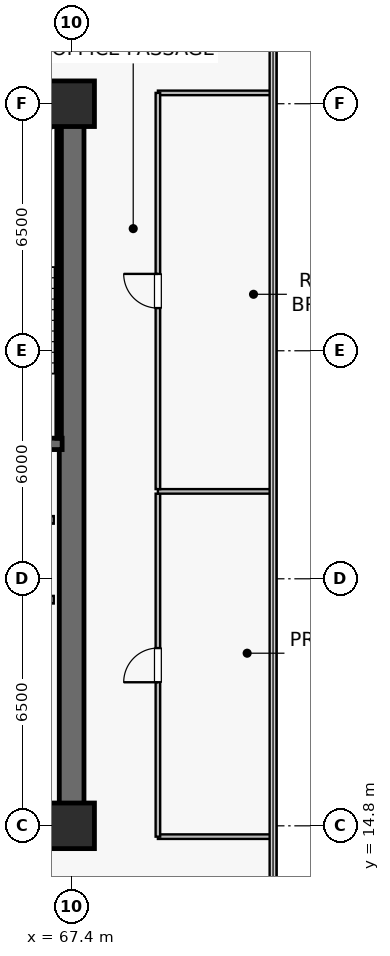
"""IFC4 building model, lengths in metres.
Left out: names, types, materials, properties, quantities, classifications, styles, units other than length and angle.
Written with IfcOpenShell. Run it as: python <this file> out.ifc"""

import sys

from ifc_helpers import new_model, si_unit, direction, frame, frame_2d, origin, origin_2d, place, context, subcontext, project, spatial, rectangle, extrude, source, transform, mapped, element, fill, save


model = new_model("IFC4")
c1 = context("Model", 3, precision=1e-05, world=origin(), true_north=direction((0.0, 1.0)))
c2 = subcontext(c1, "Body", "Model", "MODEL_VIEW")
j1 = project(units=[si_unit("LENGTHUNIT", "METRE"), si_unit("PLANEANGLEUNIT", "RADIAN")], contexts=[c1])
p1 = place(None, origin())
s1 = spatial("IfcSite", under=j1, at=p1, CompositionType="ELEMENT")
p2 = place(p1, origin())
s2 = spatial("IfcBuilding", under=s1, at=p2, CompositionType="ELEMENT")
p3 = place(p2, frame((0.0, 0.0, 183.0)))
s3 = spatial("IfcBuildingStorey", under=s2, at=p3, CompositionType="ELEMENT", Elevation=183.0)
p4 = place(p3, frame((52.275, 14.8, 0.0), z_axis=(0.0, 0.0, 1.0), x_axis=(1.0, 0.0, 0.0)))
e1 = element("IfcWall", 1, at=p4, inside=s3, PredefinedType="SHEAR", context=c2, shape_type="SweptSolid", body=[
    extrude(rectangle(XDim=15.45, YDim=0.65, at=frame_2d((7.725, 0.0))), origin(), (0.0, 0.0, 1.0), 3.79),
])
p5 = place(p3, frame((52.275, 33.8, 0.0), z_axis=(0.0, 0.0, 1.0), x_axis=(1.0, 0.0, 0.0)))
e2 = element("IfcWall", 2, at=p5, inside=s3, PredefinedType="SHEAR", context=c2, shape_type="SweptSolid", body=[
    extrude(rectangle(XDim=15.45, YDim=0.65, at=frame_2d((7.725, 0.0))), origin(), (0.0, 0.0, 1.0), 3.79),
])
p6 = place(p5, frame((8.825, 0.0, 0.0)))
e3 = element("IfcOpeningElement", 3, at=p6, cuts=e2, PredefinedType="OPENING", context=c2, shape_type="SweptSolid", body=[
    extrude(rectangle(XDim=0.95, YDim=2.15, at=frame_2d((0.475, 1.075))), frame((0.0, 0.335, 0.0), z_axis=(0.0, -1.0, 0.0), x_axis=(1.0, 0.0, 0.0)), (0.0, 0.0, 1.0), 0.67),
])
p7 = place(p5, frame((5.46, 0.0, 0.0)))
e4 = element("IfcOpeningElement", 4, at=p7, cuts=e2, PredefinedType="OPENING", context=c2, shape_type="SweptSolid", body=[
    extrude(rectangle(XDim=0.95, YDim=2.15, at=frame_2d((0.475, 1.075))), frame((0.0, 0.335, 0.0), z_axis=(0.0, -1.0, 0.0), x_axis=(1.0, 0.0, 0.0)), (0.0, 0.0, 1.0), 0.67),
])
p8 = place(p5, frame((2.06, 0.0, 0.0)))
e5 = element("IfcOpeningElement", 5, at=p8, cuts=e2, PredefinedType="OPENING", context=c2, shape_type="SweptSolid", body=[
    extrude(rectangle(XDim=0.95, YDim=2.15, at=frame_2d((0.475, 1.075))), frame((0.0, 0.335, 0.0), z_axis=(0.0, -1.0, 0.0), x_axis=(1.0, 0.0, 0.0)), (0.0, 0.0, 1.0), 0.67),
])
p9 = place(p3, frame((67.4, 15.125, 0.0), z_axis=(0.0, 0.0, 1.0), x_axis=(0.0, 1.0, 0.0)))
e6 = element("IfcWall", 6, at=p9, inside=s3, PredefinedType="SHEAR", context=c2, shape_type="SweptSolid", body=[
    extrude(rectangle(XDim=18.35, YDim=0.65, at=frame_2d((9.175, 0.0))), origin(), (0.0, 0.0, 1.0), 3.79),
])
p10 = place(p3, frame((63.35, 24.85, 0.0), z_axis=(0.0, 0.0, 1.0), x_axis=(1.0, 0.0, 0.0)))
e7 = element("IfcWall", 7, at=p10, inside=s3, PredefinedType="SHEAR", context=c2, shape_type="SweptSolid", body=[
    extrude(rectangle(XDim=3.8, YDim=0.3, at=frame_2d((1.9, 0.0))), origin(), (0.0, 0.0, 1.0), 3.79),
])
p11 = place(p3, frame((63.35, 33.4, 0.0), z_axis=(0.0, 0.0, 1.0), x_axis=(1.0, 0.0, 0.0)))
e8 = element("IfcWall", 8, at=p11, inside=s3, PredefinedType="SOLIDWALL", context=c2, shape_type="SweptSolid", body=[
    extrude(rectangle(XDim=3.72, YDim=0.12, at=frame_2d((1.86, 0.0))), origin(), (0.0, 0.0, 1.0), 3.79),
])
p12 = place(p3, frame((67.07, 25.0, 0.0), z_axis=(0.0, 0.0, 1.0), x_axis=(0.0, 1.0, 0.0)))
e9 = element("IfcWall", 9, at=p12, inside=s3, PredefinedType="SOLIDWALL", context=c2, shape_type="SweptSolid", body=[
    extrude(rectangle(XDim=8.32, YDim=0.12, at=frame_2d((4.16, 0.0))), origin(), (0.0, 0.0, 1.0), 3.79),
])
m1 = source(origin(), c2, "Body", "SweptSolid", [
    extrude(rectangle(XDim=1.2, YDim=1.2, at=origin_2d()), origin(), (0.0, 0.0, 1.0), 4.1),
])
for number, where, z_axis, x_axis in (
    (10, (67.4, 14.8, 0.0), (0.0, 0.0, 1.0), (1.0, 0.0, 0.0)),
    (11, (67.4, 33.8, 0.0), (0.0, 0.0, 1.0), (1.0, 0.0, 0.0)),
):
    element("IfcColumn", number, at=place(p3, frame(where, z_axis=z_axis, x_axis=x_axis)), inside=s3, PredefinedType="COLUMN", context=c2, shape_type="MappedRepresentation", body=[
        mapped(m1, transform((0.0, 0.0, 0.0), scale=1.0)),
    ])
for number, where, z_axis, x_axis in (
    (12, (64.67, 20.75, 0.0), (0.0, 0.0, 1.0), (1.0, 0.0, 0.0)),
    (13, (64.67, 22.85, 0.0), (0.0, 0.0, 1.0), (1.0, 0.0, 0.0)),
):
    element("IfcWall", number, at=place(p3, frame(where, z_axis=z_axis, x_axis=x_axis)), inside=s3, PredefinedType="SOLIDWALL", context=c2, shape_type="SweptSolid", body=[
        extrude(rectangle(XDim=2.26, YDim=0.2, at=frame_2d((1.13, 0.0))), origin(), (0.0, 0.0, 1.0), 3.79),
    ])
for number, where, z_axis, x_axis in (
    (14, (69.67, 14.515, 0.0), (0.0, 0.0, 1.0), (1.0, 0.0, 0.0)),
    (15, (69.67, 34.085, 0.0), (0.0, 0.0, 1.0), (1.0, 0.0, 0.0)),
):
    element("IfcWall", number, at=place(p3, frame(where, z_axis=z_axis, x_axis=x_axis)), inside=s3, PredefinedType="PARTITIONING", context=c2, shape_type="SweptSolid", body=[
        extrude(rectangle(XDim=3.02, YDim=0.12, at=frame_2d((1.51, 0.0))), origin(), (0.0, 0.0, 1.0), 3.79),
    ])
p13 = place(p3, frame((69.67, 14.515, 0.0), z_axis=(0.0, 0.0, 1.0), x_axis=(0.0, 1.0, 0.0)))
e16 = element("IfcWall", 16, at=p13, inside=s3, PredefinedType="PARTITIONING", context=c2, shape_type="SweptSolid", body=[
    extrude(rectangle(XDim=9.025, YDim=0.12, at=frame_2d((4.513, 0.0))), origin(), (0.0, 0.0, 1.0), 3.79),
])
p14 = place(p13, frame((4.062, 0.0, 0.0)))
e17 = element("IfcOpeningElement", 17, at=p14, cuts=e16, PredefinedType="OPENING", context=c2, shape_type="SweptSolid", body=[
    extrude(rectangle(XDim=0.9, YDim=2.1, at=frame_2d((0.45, 1.05))), frame((0.0, 0.07, 0.0), z_axis=(0.0, -1.0, 0.0), x_axis=(1.0, 0.0, 0.0)), (0.0, 0.0, 1.0), 0.14),
])
p15 = place(p3, frame((69.67, 23.6, 0.0), z_axis=(0.0, 0.0, 1.0), x_axis=(1.0, 0.0, 0.0)))
e18 = element("IfcWall", 18, at=p15, inside=s3, PredefinedType="PARTITIONING", context=c2, shape_type="SweptSolid", body=[
    extrude(rectangle(XDim=3.02, YDim=0.12, at=frame_2d((1.51, 0.0))), origin(), (0.0, 0.0, 1.0), 3.79),
])
p16 = place(p3, frame((69.67, 23.66, 0.0), z_axis=(0.0, 0.0, 1.0), x_axis=(0.0, 1.0, 0.0)))
e19 = element("IfcWall", 19, at=p16, inside=s3, PredefinedType="PARTITIONING", context=c2, shape_type="SweptSolid", body=[
    extrude(rectangle(XDim=10.425, YDim=0.12, at=frame_2d((5.212, 0.0))), origin(), (0.0, 0.0, 1.0), 3.79),
])
p17 = place(p16, frame((4.762, 0.0, 0.0)))
e20 = element("IfcOpeningElement", 20, at=p17, cuts=e19, PredefinedType="OPENING", context=c2, shape_type="SweptSolid", body=[
    extrude(rectangle(XDim=0.9, YDim=2.1, at=frame_2d((0.45, 1.05))), frame((0.0, 0.07, 0.0), z_axis=(0.0, -1.0, 0.0), x_axis=(1.0, 0.0, 0.0)), (0.0, 0.0, 1.0), 0.14),
])
m2 = source(origin(), c2, "Body", "SweptSolid", [
    extrude(rectangle(XDim=0.9, YDim=2.1, at=frame_2d((0.45, 1.05))), frame((0.0, 0.025, 0.0), z_axis=(0.0, -1.0, 0.0), x_axis=(1.0, 0.0, 0.0)), (0.0, 0.0, 1.0), 0.05),
])
p18 = place(p14, origin())
e21 = element("IfcDoor", 21, at=p18, inside=s3, OperationType="SINGLE_SWING_LEFT", PredefinedType="DOOR", context=c2, shape_type="MappedRepresentation", body=[
    mapped(m2, transform((0.0, 0.0, 0.0), scale=1.0)),
])
fill(e17, e21)
p19 = place(p17, origin())
e22 = element("IfcDoor", 22, at=p19, inside=s3, OperationType="SINGLE_SWING_RIGHT", PredefinedType="DOOR", context=c2, shape_type="MappedRepresentation", body=[
    mapped(m2, transform((0.0, 0.0, 0.0), scale=1.0)),
])
fill(e20, e22)
save(model, sys.argv[1])
